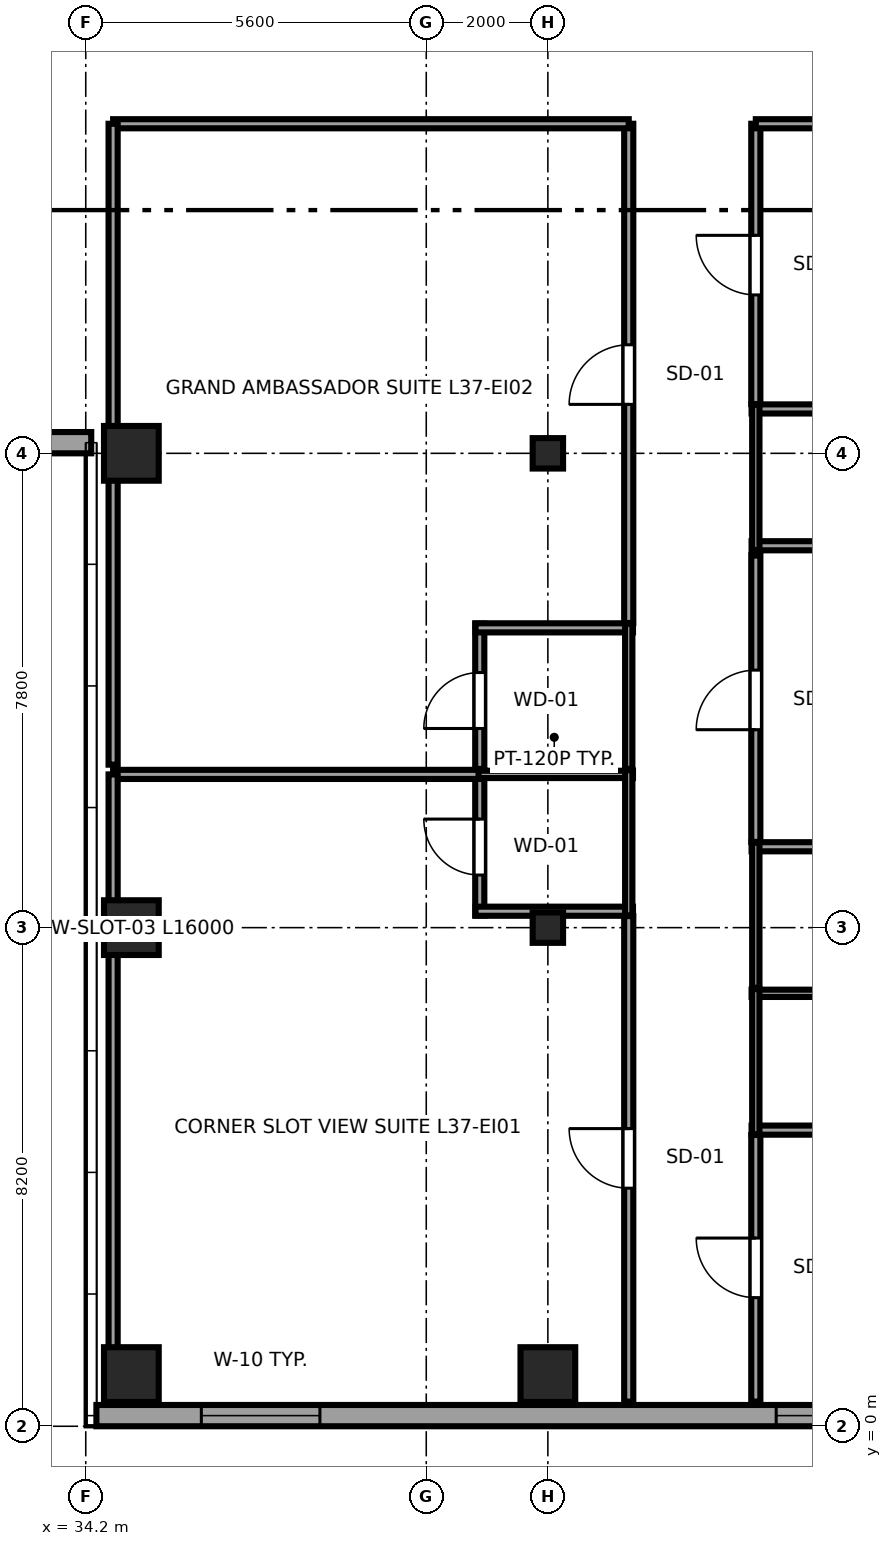
"""IFC4 building model, lengths in metres.
Left out: names, types, materials, properties, quantities, classifications, styles, units other than length and angle.
Written with IfcOpenShell. Run it as: python <this file> out.ifc"""

import sys

from ifc_helpers import new_model, si_unit, direction, frame, frame_2d, origin, origin_2d, place, context, subcontext, project, spatial, rectangle, i_section, extrude, source, transform, mapped, element, fill, save


model = new_model("IFC4")
c1 = context("Model", 3, precision=1e-05, world=origin(), true_north=direction((0.0, 1.0)))
c2 = subcontext(c1, "Body", "Model", "MODEL_VIEW")
j1 = project(units=[si_unit("LENGTHUNIT", "METRE"), si_unit("PLANEANGLEUNIT", "RADIAN")], contexts=[c1])
p1 = place(None, origin())
s1 = spatial("IfcSite", under=j1, at=p1, CompositionType="ELEMENT")
p2 = place(p1, origin())
s2 = spatial("IfcBuilding", under=s1, at=p2, CompositionType="ELEMENT")
p3 = place(p2, frame((0.0, 0.0, 143.5)))
s3 = spatial("IfcBuildingStorey", under=s2, at=p3, CompositionType="ELEMENT", Elevation=143.5)
m1 = source(origin(), c2, "Body", "SweptSolid", [
    extrude(rectangle(XDim=0.9, YDim=0.9, at=origin_2d()), origin(), (0.0, 0.0, 1.0), 3.55),
])
for number, where, z_axis, x_axis in (
    (1, (34.95, 0.85, 0.0), (0.0, 0.0, 1.0), (1.0, 0.0, 0.0)),
    (2, (34.95, 8.2, 0.0), (0.0, 0.0, 1.0), (1.0, 0.0, 0.0)),
    (3, (34.95, 16.0, 0.0), (0.0, 0.0, 1.0), (1.0, 0.0, 0.0)),
    (4, (41.8, 0.85, 0.0), (0.0, 0.0, 1.0), (1.0, 0.0, 0.0)),
):
    element("IfcColumn", number, at=place(p3, frame(where, z_axis=z_axis, x_axis=x_axis)), inside=s3, PredefinedType="COLUMN", context=c2, shape_type="MappedRepresentation", body=[
        mapped(m1, transform((0.0, 0.0, 0.0), x_axis=(1.0, 0.0, 0.0), y_axis=(0.0, 1.0, 0.0), z_axis=(0.0, 0.0, 1.0), scale=1.0)),
    ])
m2 = source(origin(), c2, "Body", "SweptSolid", [
    extrude(i_section(OverallWidth=0.5, OverallDepth=0.5, WebThickness=0.022, FlangeThickness=0.034, at=origin_2d()), origin(), (0.0, 0.0, 1.0), 3.55),
])
for number, where, z_axis, x_axis in (
    (5, (41.8, 8.2, 0.0), (0.0, 0.0, 1.0), (1.0, 0.0, 0.0)),
    (6, (41.8, 16.0, 0.0), (0.0, 0.0, 1.0), (1.0, 0.0, 0.0)),
):
    element("IfcColumn", number, at=place(p3, frame(where, z_axis=z_axis, x_axis=x_axis)), inside=s3, PredefinedType="COLUMN", context=c2, shape_type="MappedRepresentation", body=[
        mapped(m2, transform((0.0, 0.0, 0.0), x_axis=(1.0, 0.0, 0.0), y_axis=(0.0, 1.0, 0.0), z_axis=(0.0, 0.0, 1.0), scale=1.0)),
    ])
p4 = place(p3, frame((22.71, 16.175, 0.0), z_axis=(0.0, 0.0, 1.0), x_axis=(1.0, 0.0, 0.0)))
e7 = element("IfcWall", 7, at=p4, inside=s3, PredefinedType="SOLIDWALL", context=c2, shape_type="SweptSolid", body=[
    extrude(rectangle(XDim=11.58, YDim=0.35, at=frame_2d((5.79, 0.0))), origin(), (0.0, 0.0, 1.0), 2.08),
])
p5 = place(p3, frame((34.375, 0.175, 0.0), z_axis=(0.0, 0.0, 1.0), x_axis=(1.0, 0.0, 0.0)))
e8 = element("IfcWall", 8, at=p5, inside=s3, PredefinedType="SOLIDWALL", context=c2, shape_type="SweptSolid", body=[
    extrude(rectangle(XDim=18.008, YDim=0.35, at=frame_2d((9.004, 0.0))), origin(), (0.0, 0.0, 1.0), 3.29),
])
p6 = place(p5, frame((1.726, 0.0, 0.68)))
e9 = element("IfcOpeningElement", 9, at=p6, cuts=e8, PredefinedType="OPENING", context=c2, shape_type="SweptSolid", body=[
    extrude(rectangle(XDim=1.95, YDim=1.82, at=frame_2d((0.975, 0.91))), frame((0.0, 0.185, 0.0), z_axis=(0.0, -1.0, 0.0), x_axis=(1.0, 0.0, 0.0)), (0.0, 0.0, 1.0), 0.37),
])
p7 = place(p5, frame((11.18, 0.0, 0.68)))
e10 = element("IfcOpeningElement", 10, at=p7, cuts=e8, PredefinedType="OPENING", context=c2, shape_type="SweptSolid", body=[
    extrude(rectangle(XDim=1.95, YDim=1.82, at=frame_2d((0.975, 0.91))), frame((0.0, 0.185, 0.0), z_axis=(0.0, -1.0, 0.0), x_axis=(1.0, 0.0, 0.0)), (0.0, 0.0, 1.0), 0.37),
])
p8 = place(p3, frame((40.68, 8.4, 0.0), z_axis=(0.0, 0.0, 1.0), x_axis=(0.0, 1.0, 0.0)))
e11 = element("IfcWall", 11, at=p8, inside=s3, PredefinedType="PARTITIONING", context=c2, shape_type="SweptSolid", body=[
    extrude(rectangle(XDim=2.39, YDim=0.15, at=frame_2d((1.195, 0.0))), origin(), (0.0, 0.0, 1.0), 3.29),
])
p9 = place(p8, frame((0.665, 0.0, 0.0)))
e12 = element("IfcOpeningElement", 12, at=p9, cuts=e11, PredefinedType="OPENING", context=c2, shape_type="SweptSolid", body=[
    extrude(rectangle(XDim=0.92, YDim=2.01, at=frame_2d((0.46, 1.005))), frame((0.0, 0.085, 0.0), z_axis=(0.0, -1.0, 0.0), x_axis=(1.0, 0.0, 0.0)), (0.0, 0.0, 1.0), 0.17),
])
p10 = place(p3, frame((40.61, 8.47, 0.0), z_axis=(0.0, 0.0, 1.0), x_axis=(1.0, 0.0, 0.0)))
e13 = element("IfcWall", 13, at=p10, inside=s3, PredefinedType="PARTITIONING", context=c2, shape_type="SweptSolid", body=[
    extrude(rectangle(XDim=2.59, YDim=0.15, at=frame_2d((1.295, 0.0))), origin(), (0.0, 0.0, 1.0), 2.08),
])
p11 = place(p3, frame((40.61, 10.72, 0.0), z_axis=(0.0, 0.0, 1.0), x_axis=(1.0, 0.0, 0.0)))
e14 = element("IfcWall", 14, at=p11, inside=s3, PredefinedType="PLUMBINGWALL", context=c2, shape_type="SweptSolid", body=[
    extrude(rectangle(XDim=2.59, YDim=0.12, at=frame_2d((1.295, 0.0))), origin(), (0.0, 0.0, 1.0), 3.29),
])
p12 = place(p3, frame((43.13, 8.4, 0.0), z_axis=(0.0, 0.0, 1.0), x_axis=(0.0, 1.0, 0.0)))
e15 = element("IfcWall", 15, at=p12, inside=s3, PredefinedType="PLUMBINGWALL", context=c2, shape_type="SweptSolid", body=[
    extrude(rectangle(XDim=2.39, YDim=0.12, at=frame_2d((1.195, 0.0))), origin(), (0.0, 0.0, 1.0), 3.29),
])
p13 = place(p3, frame((40.68, 10.81, 0.0), z_axis=(0.0, 0.0, 1.0), x_axis=(0.0, 1.0, 0.0)))
e16 = element("IfcWall", 16, at=p13, inside=s3, PredefinedType="PARTITIONING", context=c2, shape_type="SweptSolid", body=[
    extrude(rectangle(XDim=2.39, YDim=0.15, at=frame_2d((1.195, 0.0))), origin(), (0.0, 0.0, 1.0), 3.29),
])
p14 = place(p13, frame((0.665, 0.0, 0.0)))
e17 = element("IfcOpeningElement", 17, at=p14, cuts=e16, PredefinedType="OPENING", context=c2, shape_type="SweptSolid", body=[
    extrude(rectangle(XDim=0.92, YDim=2.01, at=frame_2d((0.46, 1.005))), frame((0.0, 0.085, 0.0), z_axis=(0.0, -1.0, 0.0), x_axis=(1.0, 0.0, 0.0)), (0.0, 0.0, 1.0), 0.17),
])
p15 = place(p3, frame((40.61, 13.13, 0.0), z_axis=(0.0, 0.0, 1.0), x_axis=(1.0, 0.0, 0.0)))
e18 = element("IfcWall", 18, at=p15, inside=s3, PredefinedType="PARTITIONING", context=c2, shape_type="SweptSolid", body=[
    extrude(rectangle(XDim=2.59, YDim=0.15, at=frame_2d((1.295, 0.0))), origin(), (0.0, 0.0, 1.0), 3.29),
])
p16 = place(p3, frame((43.13, 10.81, 0.0), z_axis=(0.0, 0.0, 1.0), x_axis=(0.0, 1.0, 0.0)))
e19 = element("IfcWall", 19, at=p16, inside=s3, PredefinedType="PLUMBINGWALL", context=c2, shape_type="SweptSolid", body=[
    extrude(rectangle(XDim=2.39, YDim=0.12, at=frame_2d((1.195, 0.0))), origin(), (0.0, 0.0, 1.0), 3.29),
])
p17 = place(p3, frame((45.15, 4.87, 0.0), z_axis=(0.0, 0.0, 1.0), x_axis=(1.0, 0.0, 0.0)))
e20 = element("IfcWall", 20, at=p17, inside=s3, PredefinedType="PARTITIONING", context=c2, shape_type="SweptSolid", body=[
    extrude(rectangle(XDim=2.59, YDim=0.15, at=frame_2d((1.295, 0.0))), origin(), (0.0, 0.0, 1.0), 3.29),
])
p18 = place(p3, frame((45.15, 7.12, 0.0), z_axis=(0.0, 0.0, 1.0), x_axis=(1.0, 0.0, 0.0)))
e21 = element("IfcWall", 21, at=p18, inside=s3, PredefinedType="PLUMBINGWALL", context=c2, shape_type="SweptSolid", body=[
    extrude(rectangle(XDim=2.59, YDim=0.12, at=frame_2d((1.295, 0.0))), origin(), (0.0, 0.0, 1.0), 3.29),
])
p19 = place(p3, frame((45.22, 4.8, 0.0), z_axis=(0.0, 0.0, 1.0), x_axis=(0.0, 1.0, 0.0)))
e22 = element("IfcWall", 22, at=p19, inside=s3, PredefinedType="PLUMBINGWALL", context=c2, shape_type="SweptSolid", body=[
    extrude(rectangle(XDim=2.39, YDim=0.12, at=frame_2d((1.195, 0.0))), origin(), (0.0, 0.0, 1.0), 3.29),
])
p20 = place(p3, frame((45.15, 9.53, 0.0), z_axis=(0.0, 0.0, 1.0), x_axis=(1.0, 0.0, 0.0)))
e23 = element("IfcWall", 23, at=p20, inside=s3, PredefinedType="PARTITIONING", context=c2, shape_type="SweptSolid", body=[
    extrude(rectangle(XDim=2.59, YDim=0.15, at=frame_2d((1.295, 0.0))), origin(), (0.0, 0.0, 1.0), 3.29),
])
p21 = place(p3, frame((45.22, 7.21, 0.0), z_axis=(0.0, 0.0, 1.0), x_axis=(0.0, 1.0, 0.0)))
e24 = element("IfcWall", 24, at=p21, inside=s3, PredefinedType="PLUMBINGWALL", context=c2, shape_type="SweptSolid", body=[
    extrude(rectangle(XDim=2.39, YDim=0.12, at=frame_2d((1.195, 0.0))), origin(), (0.0, 0.0, 1.0), 3.29),
])
p22 = place(p3, frame((45.15, 14.48, 0.0), z_axis=(0.0, 0.0, 1.0), x_axis=(1.0, 0.0, 0.0)))
e25 = element("IfcWall", 25, at=p22, inside=s3, PredefinedType="PARTITIONING", context=c2, shape_type="SweptSolid", body=[
    extrude(rectangle(XDim=11.445, YDim=0.15, at=frame_2d((5.723, 0.0))), origin(), (0.0, 0.0, 1.0), 3.29),
])
p23 = place(p3, frame((45.15, 16.73, 0.0), z_axis=(0.0, 0.0, 1.0), x_axis=(1.0, 0.0, 0.0)))
e26 = element("IfcWall", 26, at=p23, inside=s3, PredefinedType="PARTITIONING", context=c2, shape_type="SweptSolid", body=[
    extrude(rectangle(XDim=2.59, YDim=0.15, at=frame_2d((1.295, 0.0))), origin(), (0.0, 0.0, 1.0), 3.29),
])
p24 = place(p3, frame((45.22, 14.41, 0.0), z_axis=(0.0, 0.0, 1.0), x_axis=(0.0, 1.0, 0.0)))
e27 = element("IfcWall", 27, at=p24, inside=s3, PredefinedType="PLUMBINGWALL", context=c2, shape_type="SweptSolid", body=[
    extrude(rectangle(XDim=2.39, YDim=0.12, at=frame_2d((1.195, 0.0))), origin(), (0.0, 0.0, 1.0), 3.29),
])
p25 = place(p3, frame((43.13, 0.405, 0.0), z_axis=(0.0, 0.0, 1.0), x_axis=(0.0, 1.0, 0.0)))
e28 = element("IfcWall", 28, at=p25, inside=s3, PredefinedType="PARTITIONING", context=c2, shape_type="SweptSolid", body=[
    extrude(rectangle(XDim=7.985, YDim=0.15, at=frame_2d((3.992, 0.0))), origin(), (0.0, 0.0, 1.0), 3.29),
])
p26 = place(p25, frame((3.51, 0.0, 0.0)))
e29 = element("IfcOpeningElement", 29, at=p26, cuts=e28, PredefinedType="OPENING", context=c2, shape_type="SweptSolid", body=[
    extrude(rectangle(XDim=0.98, YDim=2.12, at=frame_2d((0.49, 1.06))), frame((0.0, 0.085, 0.0), z_axis=(0.0, -1.0, 0.0), x_axis=(1.0, 0.0, 0.0)), (0.0, 0.0, 1.0), 0.17),
])
p27 = place(p3, frame((34.65, 10.72, 0.0), z_axis=(0.0, 0.0, 1.0), x_axis=(1.0, 0.0, 0.0)))
e30 = element("IfcWall", 30, at=p27, inside=s3, PredefinedType="PARTITIONING", context=c2, shape_type="SweptSolid", body=[
    extrude(rectangle(XDim=6.01, YDim=0.15, at=frame_2d((3.005, 0.0))), origin(), (0.0, 0.0, 1.0), 3.29),
])
p28 = place(p3, frame((34.65, 0.405, 0.0), z_axis=(0.0, 0.0, 1.0), x_axis=(0.0, 1.0, 0.0)))
e31 = element("IfcWall", 31, at=p28, inside=s3, PredefinedType="PARTITIONING", context=c2, shape_type="SweptSolid", body=[
    extrude(rectangle(XDim=10.315, YDim=0.15, at=frame_2d((5.157, 0.0))), origin(), (0.0, 0.0, 1.0), 2.08),
])
p29 = place(p3, frame((43.13, 13.21, 0.0), z_axis=(0.0, 0.0, 1.0), x_axis=(0.0, 1.0, 0.0)))
e32 = element("IfcWall", 32, at=p29, inside=s3, PredefinedType="PARTITIONING", context=c2, shape_type="SweptSolid", body=[
    extrude(rectangle(XDim=8.21, YDim=0.15, at=frame_2d((4.105, 0.0))), origin(), (0.0, 0.0, 1.0), 3.29),
])
p30 = place(p29, frame((3.595, 0.0, 0.0)))
e33 = element("IfcOpeningElement", 33, at=p30, cuts=e32, PredefinedType="OPENING", context=c2, shape_type="SweptSolid", body=[
    extrude(rectangle(XDim=0.98, YDim=2.12, at=frame_2d((0.49, 1.06))), frame((0.0, 0.085, 0.0), z_axis=(0.0, -1.0, 0.0), x_axis=(1.0, 0.0, 0.0)), (0.0, 0.0, 1.0), 0.17),
])
p31 = place(p3, frame((34.65, 21.42, 0.0), z_axis=(0.0, 0.0, 1.0), x_axis=(1.0, 0.0, 0.0)))
e34 = element("IfcWall", 34, at=p31, inside=s3, PredefinedType="PARTITIONING", context=c2, shape_type="SweptSolid", body=[
    extrude(rectangle(XDim=8.48, YDim=0.15, at=frame_2d((4.24, 0.0))), origin(), (0.0, 0.0, 1.0), 3.29),
])
p32 = place(p3, frame((34.65, 10.88, 0.0), z_axis=(0.0, 0.0, 1.0), x_axis=(0.0, 1.0, 0.0)))
e35 = element("IfcWall", 35, at=p32, inside=s3, PredefinedType="PARTITIONING", context=c2, shape_type="SweptSolid", body=[
    extrude(rectangle(XDim=10.54, YDim=0.15, at=frame_2d((5.27, 0.0))), origin(), (0.0, 0.0, 1.0), 2.08),
])
p33 = place(p3, frame((45.22, 0.405, 0.0), z_axis=(0.0, 0.0, 1.0), x_axis=(0.0, 1.0, 0.0)))
e36 = element("IfcWall", 36, at=p33, inside=s3, PredefinedType="PARTITIONING", context=c2, shape_type="SweptSolid", body=[
    extrude(rectangle(XDim=4.385, YDim=0.15, at=frame_2d((2.192, 0.0))), origin(), (0.0, 0.0, 1.0), 3.29),
])
p34 = place(p33, frame((1.71, 0.0, 0.0)))
e37 = element("IfcOpeningElement", 37, at=p34, cuts=e36, PredefinedType="OPENING", context=c2, shape_type="SweptSolid", body=[
    extrude(rectangle(XDim=0.98, YDim=2.12, at=frame_2d((0.49, 1.06))), frame((0.0, 0.085, 0.0), z_axis=(0.0, -1.0, 0.0), x_axis=(1.0, 0.0, 0.0)), (0.0, 0.0, 1.0), 0.17),
])
p35 = place(p3, frame((45.22, 9.61, 0.0), z_axis=(0.0, 0.0, 1.0), x_axis=(0.0, 1.0, 0.0)))
e38 = element("IfcWall", 38, at=p35, inside=s3, PredefinedType="PARTITIONING", context=c2, shape_type="SweptSolid", body=[
    extrude(rectangle(XDim=4.71, YDim=0.15, at=frame_2d((2.355, 0.0))), origin(), (0.0, 0.0, 1.0), 3.29),
])
p36 = place(p35, frame((1.845, 0.0, 0.0)))
e39 = element("IfcOpeningElement", 39, at=p36, cuts=e38, PredefinedType="OPENING", context=c2, shape_type="SweptSolid", body=[
    extrude(rectangle(XDim=0.98, YDim=2.12, at=frame_2d((0.49, 1.06))), frame((0.0, 0.085, 0.0), z_axis=(0.0, -1.0, 0.0), x_axis=(1.0, 0.0, 0.0)), (0.0, 0.0, 1.0), 0.17),
])
p37 = place(p3, frame((45.22, 16.81, 0.0), z_axis=(0.0, 0.0, 1.0), x_axis=(0.0, 1.0, 0.0)))
e40 = element("IfcWall", 40, at=p37, inside=s3, PredefinedType="PARTITIONING", context=c2, shape_type="SweptSolid", body=[
    extrude(rectangle(XDim=4.61, YDim=0.15, at=frame_2d((2.305, 0.0))), origin(), (0.0, 0.0, 1.0), 3.29),
])
p38 = place(p37, frame((1.795, 0.0, 0.0)))
e41 = element("IfcOpeningElement", 41, at=p38, cuts=e40, PredefinedType="OPENING", context=c2, shape_type="SweptSolid", body=[
    extrude(rectangle(XDim=0.98, YDim=2.12, at=frame_2d((0.49, 1.06))), frame((0.0, 0.085, 0.0), z_axis=(0.0, -1.0, 0.0), x_axis=(1.0, 0.0, 0.0)), (0.0, 0.0, 1.0), 0.17),
])
p39 = place(p3, frame((45.22, 21.42, 0.0), z_axis=(0.0, 0.0, 1.0), x_axis=(1.0, 0.0, 0.0)))
e42 = element("IfcWall", 42, at=p39, inside=s3, PredefinedType="PARTITIONING", context=c2, shape_type="SweptSolid", body=[
    extrude(rectangle(XDim=11.375, YDim=0.15, at=frame_2d((5.688, 0.0))), origin(), (0.0, 0.0, 1.0), 3.29),
])
m3 = source(origin(), c2, "Body", "SweptSolid", [
    extrude(rectangle(XDim=1.95, YDim=1.82, at=frame_2d((0.975, 0.91))), frame((0.0, 0.09, 0.0), z_axis=(0.0, -1.0, 0.0), x_axis=(1.0, 0.0, 0.0)), (0.0, 0.0, 1.0), 0.06),
])
p40 = place(p6, origin())
e43 = element("IfcWindow", 43, at=p40, inside=s3, PartitioningType="DOUBLE_PANEL_VERTICAL", PredefinedType="WINDOW", context=c2, shape_type="MappedRepresentation", body=[
    mapped(m3, transform((0.0, 0.0, 0.0), x_axis=(1.0, 0.0, 0.0), y_axis=(0.0, 1.0, 0.0), z_axis=(0.0, 0.0, 1.0), scale=1.0)),
])
fill(e9, e43)
p41 = place(p7, origin())
e44 = element("IfcWindow", 44, at=p41, inside=s3, PartitioningType="DOUBLE_PANEL_VERTICAL", PredefinedType="WINDOW", context=c2, shape_type="MappedRepresentation", body=[
    mapped(m3, transform((0.0, 0.0, 0.0), x_axis=(1.0, 0.0, 0.0), y_axis=(0.0, 1.0, 0.0), z_axis=(0.0, 0.0, 1.0), scale=1.0)),
])
fill(e10, e44)
m4 = source(origin(), c2, "Body", "SweptSolid", [
    extrude(rectangle(XDim=0.92, YDim=2.01, at=frame_2d((0.46, 1.005))), frame((0.0, 0.025, 0.0), z_axis=(0.0, -1.0, 0.0), x_axis=(1.0, 0.0, 0.0)), (0.0, 0.0, 1.0), 0.05),
])
p42 = place(p9, origin())
e45 = element("IfcDoor", 45, at=p42, inside=s3, OperationType="SINGLE_SWING_RIGHT", PredefinedType="DOOR", context=c2, shape_type="MappedRepresentation", body=[
    mapped(m4, transform((0.0, 0.0, 0.0), x_axis=(1.0, 0.0, 0.0), y_axis=(0.0, 1.0, 0.0), z_axis=(0.0, 0.0, 1.0), scale=1.0)),
])
fill(e12, e45)
p43 = place(p14, origin())
e46 = element("IfcDoor", 46, at=p43, inside=s3, OperationType="SINGLE_SWING_LEFT", PredefinedType="DOOR", context=c2, shape_type="MappedRepresentation", body=[
    mapped(m4, transform((0.0, 0.0, 0.0), x_axis=(1.0, 0.0, 0.0), y_axis=(0.0, 1.0, 0.0), z_axis=(0.0, 0.0, 1.0), scale=1.0)),
])
fill(e17, e46)
m5 = source(origin(), c2, "Body", "SweptSolid", [
    extrude(rectangle(XDim=0.98, YDim=2.12, at=frame_2d((0.49, 1.06))), frame((0.0, 0.025, 0.0), z_axis=(0.0, -1.0, 0.0), x_axis=(1.0, 0.0, 0.0)), (0.0, 0.0, 1.0), 0.05),
])
p44 = place(p26, origin())
e47 = element("IfcDoor", 47, at=p44, inside=s3, OperationType="SINGLE_SWING_RIGHT", PredefinedType="DOOR", context=c2, shape_type="MappedRepresentation", body=[
    mapped(m5, transform((0.0, 0.0, 0.0), x_axis=(1.0, 0.0, 0.0), y_axis=(0.0, 1.0, 0.0), z_axis=(0.0, 0.0, 1.0), scale=1.0)),
])
fill(e29, e47)
p45 = place(p30, origin())
e48 = element("IfcDoor", 48, at=p45, inside=s3, OperationType="SINGLE_SWING_LEFT", PredefinedType="DOOR", context=c2, shape_type="MappedRepresentation", body=[
    mapped(m5, transform((0.0, 0.0, 0.0), x_axis=(1.0, 0.0, 0.0), y_axis=(0.0, 1.0, 0.0), z_axis=(0.0, 0.0, 1.0), scale=1.0)),
])
fill(e33, e48)
p46 = place(p34, origin())
e49 = element("IfcDoor", 49, at=p46, inside=s3, OperationType="SINGLE_SWING_RIGHT", PredefinedType="DOOR", context=c2, shape_type="MappedRepresentation", body=[
    mapped(m5, transform((0.0, 0.0, 0.0), x_axis=(1.0, 0.0, 0.0), y_axis=(0.0, 1.0, 0.0), z_axis=(0.0, 0.0, 1.0), scale=1.0)),
])
fill(e37, e49)
p47 = place(p36, origin())
e50 = element("IfcDoor", 50, at=p47, inside=s3, OperationType="SINGLE_SWING_LEFT", PredefinedType="DOOR", context=c2, shape_type="MappedRepresentation", body=[
    mapped(m5, transform((0.0, 0.0, 0.0), x_axis=(1.0, 0.0, 0.0), y_axis=(0.0, 1.0, 0.0), z_axis=(0.0, 0.0, 1.0), scale=1.0)),
])
fill(e39, e50)
p48 = place(p38, origin())
e51 = element("IfcDoor", 51, at=p48, inside=s3, OperationType="SINGLE_SWING_RIGHT", PredefinedType="DOOR", context=c2, shape_type="MappedRepresentation", body=[
    mapped(m5, transform((0.0, 0.0, 0.0), x_axis=(1.0, 0.0, 0.0), y_axis=(0.0, 1.0, 0.0), z_axis=(0.0, 0.0, 1.0), scale=1.0)),
])
fill(e41, e51)
save(model, sys.argv[1])
